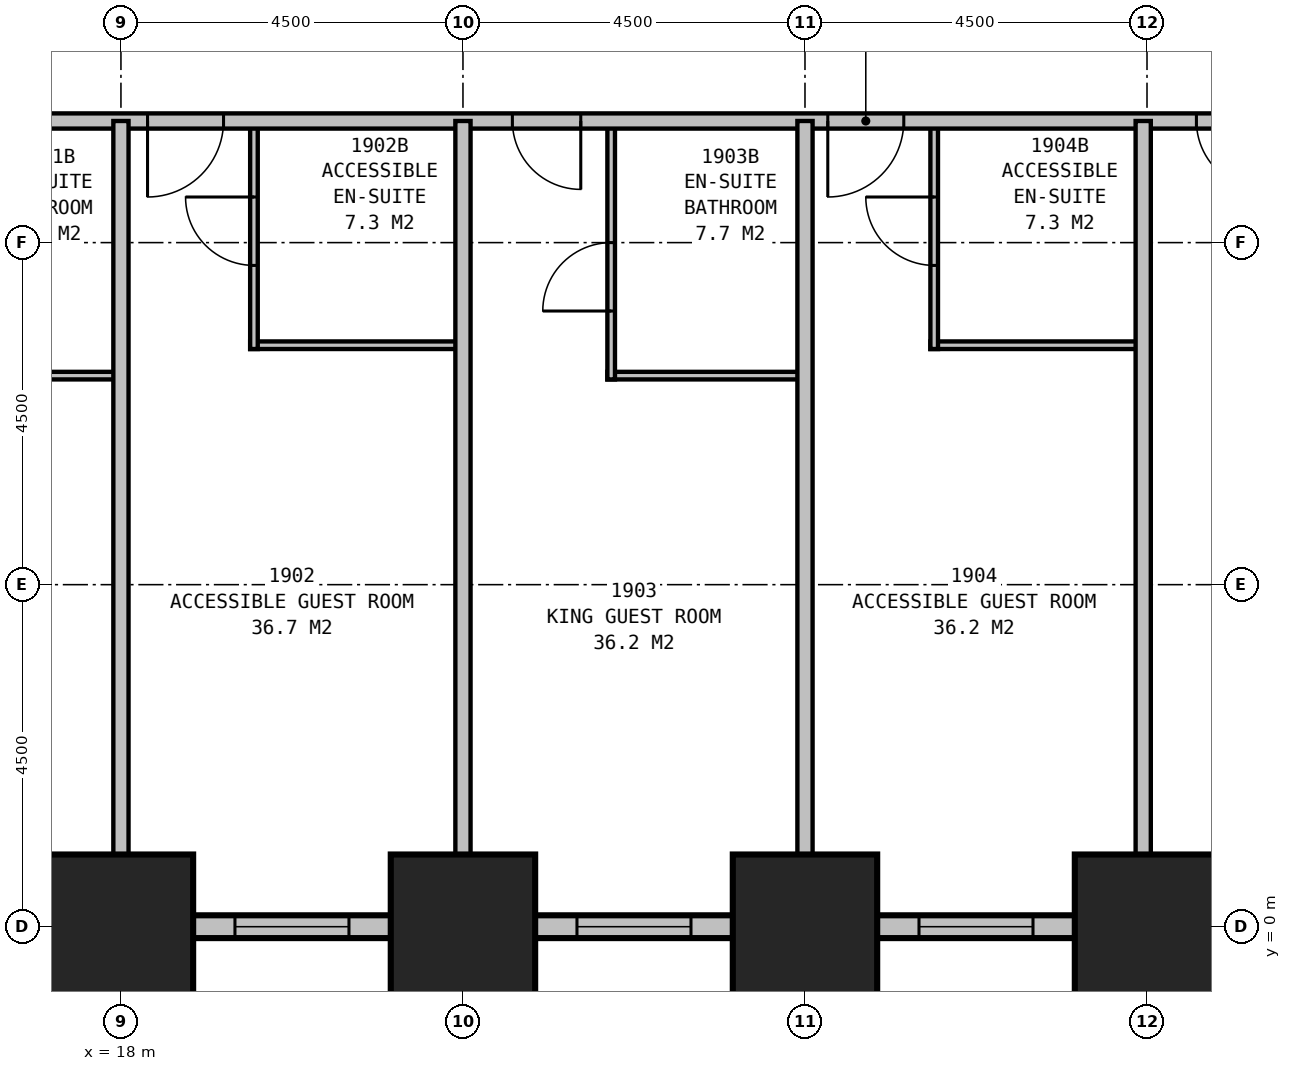
"""IFC4 building model, lengths in metres.
Left out: names, types, materials, properties, quantities, classifications, styles, units other than length and angle.
Written with IfcOpenShell. Run it as: python <this file> out.ifc"""

import sys

from ifc_helpers import new_model, si_unit, direction, frame, frame_2d, origin, origin_2d, place, context, subcontext, project, spatial, rectangle, extrude, element, fill, save


model = new_model("IFC4")
c1 = context("Model", 3, precision=1e-05, world=origin(), true_north=direction((0.0, 1.0)))
c2 = subcontext(c1, "Body", "Model", "MODEL_VIEW")
j1 = project(units=[si_unit("LENGTHUNIT", "METRE"), si_unit("PLANEANGLEUNIT", "RADIAN")], contexts=[c1])
p1 = place(None, origin())
s1 = spatial("IfcSite", under=j1, at=p1, CompositionType="ELEMENT")
p2 = place(p1, origin())
s2 = spatial("IfcBuilding", under=s1, at=p2, CompositionType="ELEMENT")
p3 = place(p2, frame((0.0, 0.0, 78.7)))
s3 = spatial("IfcBuildingStorey", under=s2, at=p3, CompositionType="ELEMENT", Elevation=78.7)
for number, where, z_axis, x_axis in (
    (1, (18.0, 0.0, 0.0), (0.0, 0.0, 1.0), (1.0, 0.0, 0.0)),
    (2, (22.5, 0.0, 0.0), (0.0, 0.0, 1.0), (1.0, 0.0, 0.0)),
    (3, (27.0, 0.0, 0.0), (0.0, 0.0, 1.0), (1.0, 0.0, 0.0)),
    (4, (31.5, 0.0, 0.0), (0.0, 0.0, 1.0), (1.0, 0.0, 0.0)),
):
    element("IfcColumn", number, at=place(p3, frame(where, z_axis=z_axis, x_axis=x_axis)), inside=s3, PredefinedType="COLUMN", context=c2, shape_type="SweptSolid", body=[
        extrude(rectangle(XDim=1.9, YDim=1.9, at=origin_2d()), origin(), (0.0, 0.0, 1.0), 3.5),
    ])
p4 = place(p3, frame((4.35, 0.0, 0.0), z_axis=(0.0, 0.0, 1.0), x_axis=(1.0, 0.0, 0.0)))
e5 = element("IfcWall", 5, at=p4, inside=s3, PredefinedType="STANDARD", context=c2, shape_type="SweptSolid", body=[
    extrude(rectangle(XDim=40.8, YDim=0.3, at=frame_2d((20.4, 0.0))), origin(), (0.0, 0.0, 1.0), 2.05),
])
p5 = place(p4, frame((1.65, 0.0, 0.5)))
e6 = element("IfcOpeningElement", 6, at=p5, cuts=e5, PredefinedType="OPENING", context=c2, shape_type="SweptSolid", body=[
    extrude(rectangle(XDim=1.5, YDim=1.4, at=frame_2d((0.75, 0.7))), frame((0.0, 0.16, 0.0), z_axis=(0.0, -1.0, 0.0), x_axis=(1.0, 0.0, 0.0)), (0.0, 0.0, 1.0), 0.32),
])
p6 = place(p4, frame((6.15, 0.0, 0.5)))
e7 = element("IfcOpeningElement", 7, at=p6, cuts=e5, PredefinedType="OPENING", context=c2, shape_type="SweptSolid", body=[
    extrude(rectangle(XDim=1.5, YDim=1.4, at=frame_2d((0.75, 0.7))), frame((0.0, 0.16, 0.0), z_axis=(0.0, -1.0, 0.0), x_axis=(1.0, 0.0, 0.0)), (0.0, 0.0, 1.0), 0.32),
])
p7 = place(p4, frame((10.65, 0.0, 0.5)))
e8 = element("IfcOpeningElement", 8, at=p7, cuts=e5, PredefinedType="OPENING", context=c2, shape_type="SweptSolid", body=[
    extrude(rectangle(XDim=1.5, YDim=1.4, at=frame_2d((0.75, 0.7))), frame((0.0, 0.16, 0.0), z_axis=(0.0, -1.0, 0.0), x_axis=(1.0, 0.0, 0.0)), (0.0, 0.0, 1.0), 0.32),
])
p8 = place(p4, frame((15.15, 0.0, 0.5)))
e9 = element("IfcOpeningElement", 9, at=p8, cuts=e5, PredefinedType="OPENING", context=c2, shape_type="SweptSolid", body=[
    extrude(rectangle(XDim=1.5, YDim=1.4, at=frame_2d((0.75, 0.7))), frame((0.0, 0.16, 0.0), z_axis=(0.0, -1.0, 0.0), x_axis=(1.0, 0.0, 0.0)), (0.0, 0.0, 1.0), 0.32),
])
p9 = place(p4, frame((19.65, 0.0, 0.5)))
e10 = element("IfcOpeningElement", 10, at=p9, cuts=e5, PredefinedType="OPENING", context=c2, shape_type="SweptSolid", body=[
    extrude(rectangle(XDim=1.5, YDim=1.4, at=frame_2d((0.75, 0.7))), frame((0.0, 0.16, 0.0), z_axis=(0.0, -1.0, 0.0), x_axis=(1.0, 0.0, 0.0)), (0.0, 0.0, 1.0), 0.32),
])
p10 = place(p4, frame((24.15, 0.0, 0.5)))
e11 = element("IfcOpeningElement", 11, at=p10, cuts=e5, PredefinedType="OPENING", context=c2, shape_type="SweptSolid", body=[
    extrude(rectangle(XDim=1.5, YDim=1.4, at=frame_2d((0.75, 0.7))), frame((0.0, 0.16, 0.0), z_axis=(0.0, -1.0, 0.0), x_axis=(1.0, 0.0, 0.0)), (0.0, 0.0, 1.0), 0.32),
])
p11 = place(p4, frame((28.65, 0.0, 0.5)))
e12 = element("IfcOpeningElement", 12, at=p11, cuts=e5, PredefinedType="OPENING", context=c2, shape_type="SweptSolid", body=[
    extrude(rectangle(XDim=1.5, YDim=1.4, at=frame_2d((0.75, 0.7))), frame((0.0, 0.16, 0.0), z_axis=(0.0, -1.0, 0.0), x_axis=(1.0, 0.0, 0.0)), (0.0, 0.0, 1.0), 0.32),
])
p12 = place(p4, frame((33.15, 0.0, 0.5)))
e13 = element("IfcOpeningElement", 13, at=p12, cuts=e5, PredefinedType="OPENING", context=c2, shape_type="SweptSolid", body=[
    extrude(rectangle(XDim=1.5, YDim=1.4, at=frame_2d((0.75, 0.7))), frame((0.0, 0.16, 0.0), z_axis=(0.0, -1.0, 0.0), x_axis=(1.0, 0.0, 0.0)), (0.0, 0.0, 1.0), 0.32),
])
p13 = place(p4, frame((37.65, 0.0, 0.5)))
e14 = element("IfcOpeningElement", 14, at=p13, cuts=e5, PredefinedType="OPENING", context=c2, shape_type="SweptSolid", body=[
    extrude(rectangle(XDim=1.5, YDim=1.4, at=frame_2d((0.75, 0.7))), frame((0.0, 0.16, 0.0), z_axis=(0.0, -1.0, 0.0), x_axis=(1.0, 0.0, 0.0)), (0.0, 0.0, 1.0), 0.32),
])
p14 = place(p3, frame((11.2, 10.6, 0.0), z_axis=(0.0, 0.0, 1.0), x_axis=(1.0, 0.0, 0.0)))
e15 = element("IfcWall", 15, at=p14, inside=s3, PredefinedType="PARTITIONING", context=c2, shape_type="SweptSolid", body=[
    extrude(rectangle(XDim=27.1, YDim=0.2, at=frame_2d((13.55, 0.0))), origin(), (0.0, 0.0, 1.0), 3.25),
])
p15 = place(p14, frame((3.85, 0.0, 0.0), z_axis=(0.0, 0.0, 1.0), x_axis=(-1.0, 0.0, 0.0)))
e16 = element("IfcOpeningElement", 16, at=p15, cuts=e15, PredefinedType="OPENING", context=c2, shape_type="SweptSolid", body=[
    extrude(rectangle(XDim=0.9, YDim=2.1, at=frame_2d((0.45, 1.05))), frame((0.0, 0.11, 0.0), z_axis=(0.0, -1.0, 0.0), x_axis=(1.0, 0.0, 0.0)), (0.0, 0.0, 1.0), 0.22),
])
p16 = place(p14, frame((8.15, 0.0, 0.0), z_axis=(0.0, 0.0, 1.0), x_axis=(-1.0, 0.0, 0.0)))
e17 = element("IfcOpeningElement", 17, at=p16, cuts=e15, PredefinedType="OPENING", context=c2, shape_type="SweptSolid", body=[
    extrude(rectangle(XDim=1.0, YDim=2.1, at=frame_2d((0.5, 1.05))), frame((0.0, 0.11, 0.0), z_axis=(0.0, -1.0, 0.0), x_axis=(1.0, 0.0, 0.0)), (0.0, 0.0, 1.0), 0.22),
])
p17 = place(p14, frame((12.85, 0.0, 0.0), z_axis=(0.0, 0.0, 1.0), x_axis=(-1.0, 0.0, 0.0)))
e18 = element("IfcOpeningElement", 18, at=p17, cuts=e15, PredefinedType="OPENING", context=c2, shape_type="SweptSolid", body=[
    extrude(rectangle(XDim=0.9, YDim=2.1, at=frame_2d((0.45, 1.05))), frame((0.0, 0.11, 0.0), z_axis=(0.0, -1.0, 0.0), x_axis=(1.0, 0.0, 0.0)), (0.0, 0.0, 1.0), 0.22),
])
p18 = place(p14, frame((17.1, 0.0, 0.0), z_axis=(0.0, 0.0, 1.0), x_axis=(-1.0, 0.0, 0.0)))
e19 = element("IfcOpeningElement", 19, at=p18, cuts=e15, PredefinedType="OPENING", context=c2, shape_type="SweptSolid", body=[
    extrude(rectangle(XDim=1.0, YDim=2.1, at=frame_2d((0.5, 1.05))), frame((0.0, 0.11, 0.0), z_axis=(0.0, -1.0, 0.0), x_axis=(1.0, 0.0, 0.0)), (0.0, 0.0, 1.0), 0.22),
])
p19 = place(p14, frame((21.85, 0.0, 0.0), z_axis=(0.0, 0.0, 1.0), x_axis=(-1.0, 0.0, 0.0)))
e20 = element("IfcOpeningElement", 20, at=p19, cuts=e15, PredefinedType="OPENING", context=c2, shape_type="SweptSolid", body=[
    extrude(rectangle(XDim=0.9, YDim=2.1, at=frame_2d((0.45, 1.05))), frame((0.0, 0.11, 0.0), z_axis=(0.0, -1.0, 0.0), x_axis=(1.0, 0.0, 0.0)), (0.0, 0.0, 1.0), 0.22),
])
p20 = place(p14, frame((1.6, 0.0, 0.0), z_axis=(0.0, 0.0, 1.0), x_axis=(-1.0, 0.0, 0.0)))
e21 = element("IfcOpeningElement", 21, at=p20, cuts=e15, PredefinedType="OPENING", context=c2, shape_type="SweptSolid", body=[
    extrude(rectangle(XDim=0.9, YDim=2.1, at=frame_2d((0.45, 1.05))), frame((0.0, 0.11, 0.0), z_axis=(0.0, -1.0, 0.0), x_axis=(1.0, 0.0, 0.0)), (0.0, 0.0, 1.0), 0.22),
])
p21 = place(p14, frame((26.4, 0.0, 0.0), z_axis=(0.0, 0.0, 1.0), x_axis=(-1.0, 0.0, 0.0)))
e22 = element("IfcOpeningElement", 22, at=p21, cuts=e15, PredefinedType="OPENING", context=c2, shape_type="SweptSolid", body=[
    extrude(rectangle(XDim=0.9, YDim=2.1, at=frame_2d((0.45, 1.05))), frame((0.0, 0.11, 0.0), z_axis=(0.0, -1.0, 0.0), x_axis=(1.0, 0.0, 0.0)), (0.0, 0.0, 1.0), 0.22),
])
for number, where, z_axis, x_axis in (
    (23, (18.0, 10.6, 0.0), (0.0, 0.0, 1.0), (0.0, -1.0, 0.0)),
    (24, (22.5, 10.6, 0.0), (0.0, 0.0, 1.0), (0.0, -1.0, 0.0)),
    (25, (27.0, 10.6, 0.0), (0.0, 0.0, 1.0), (0.0, -1.0, 0.0)),
    (26, (31.45, 10.6, 0.0), (0.0, 0.0, 1.0), (0.0, -1.0, 0.0)),
):
    element("IfcWall", number, at=place(p3, frame(where, z_axis=z_axis, x_axis=x_axis)), inside=s3, PredefinedType="PARTITIONING", context=c2, shape_type="SweptSolid", body=[
        extrude(rectangle(XDim=10.6, YDim=0.2, at=frame_2d((5.3, 0.0))), origin(), (0.0, 0.0, 1.0), 2.25),
    ])
p22 = place(p3, frame((15.4, 7.25, 0.0), z_axis=(0.0, 0.0, 1.0), x_axis=(1.0, 0.0, 0.0)))
e27 = element("IfcWall", 27, at=p22, inside=s3, PredefinedType="PLUMBINGWALL", context=c2, shape_type="SweptSolid", body=[
    extrude(rectangle(XDim=2.6, YDim=0.1, at=frame_2d((1.3, 0.0))), origin(), (0.0, 0.0, 1.0), 3.25),
])
p23 = place(p3, frame((19.7, 7.65, 0.0), z_axis=(0.0, 0.0, 1.0), x_axis=(1.0, 0.0, 0.0)))
e28 = element("IfcWall", 28, at=p23, inside=s3, PredefinedType="PLUMBINGWALL", context=c2, shape_type="SweptSolid", body=[
    extrude(rectangle(XDim=2.8, YDim=0.1, at=frame_2d((1.4, 0.0))), origin(), (0.0, 0.0, 1.0), 3.25),
])
p24 = place(p3, frame((19.75, 10.6, 0.0), z_axis=(0.0, 0.0, 1.0), x_axis=(0.0, -1.0, 0.0)))
e29 = element("IfcWall", 29, at=p24, inside=s3, PredefinedType="PLUMBINGWALL", context=c2, shape_type="SweptSolid", body=[
    extrude(rectangle(XDim=3.0, YDim=0.1, at=frame_2d((1.5, 0.0))), origin(), (0.0, 0.0, 1.0), 3.25),
])
p25 = place(p24, frame((1.9, 0.0, 0.0), z_axis=(0.0, 0.0, 1.0), x_axis=(-1.0, 0.0, 0.0)))
e30 = element("IfcOpeningElement", 30, at=p25, cuts=e29, PredefinedType="OPENING", context=c2, shape_type="SweptSolid", body=[
    extrude(rectangle(XDim=0.9, YDim=2.1, at=frame_2d((0.45, 1.05))), frame((0.0, 0.06, 0.0), z_axis=(0.0, -1.0, 0.0), x_axis=(1.0, 0.0, 0.0)), (0.0, 0.0, 1.0), 0.12),
])
p26 = place(p3, frame((24.4, 7.25, 0.0), z_axis=(0.0, 0.0, 1.0), x_axis=(1.0, 0.0, 0.0)))
e31 = element("IfcWall", 31, at=p26, inside=s3, PredefinedType="PLUMBINGWALL", context=c2, shape_type="SweptSolid", body=[
    extrude(rectangle(XDim=2.6, YDim=0.1, at=frame_2d((1.3, 0.0))), origin(), (0.0, 0.0, 1.0), 3.25),
])
p27 = place(p3, frame((24.45, 10.6, 0.0), z_axis=(0.0, 0.0, 1.0), x_axis=(0.0, -1.0, 0.0)))
e32 = element("IfcWall", 32, at=p27, inside=s3, PredefinedType="PLUMBINGWALL", context=c2, shape_type="SweptSolid", body=[
    extrude(rectangle(XDim=3.4, YDim=0.1, at=frame_2d((1.7, 0.0))), origin(), (0.0, 0.0, 1.0), 3.25),
])
p28 = place(p27, frame((2.5, 0.0, 0.0), z_axis=(0.0, 0.0, 1.0), x_axis=(-1.0, 0.0, 0.0)))
e33 = element("IfcOpeningElement", 33, at=p28, cuts=e32, PredefinedType="OPENING", context=c2, shape_type="SweptSolid", body=[
    extrude(rectangle(XDim=0.9, YDim=2.1, at=frame_2d((0.45, 1.05))), frame((0.0, 0.06, 0.0), z_axis=(0.0, -1.0, 0.0), x_axis=(1.0, 0.0, 0.0)), (0.0, 0.0, 1.0), 0.12),
])
p29 = place(p3, frame((28.65, 7.65, 0.0), z_axis=(0.0, 0.0, 1.0), x_axis=(1.0, 0.0, 0.0)))
e34 = element("IfcWall", 34, at=p29, inside=s3, PredefinedType="PLUMBINGWALL", context=c2, shape_type="SweptSolid", body=[
    extrude(rectangle(XDim=2.8, YDim=0.1, at=frame_2d((1.4, 0.0))), origin(), (0.0, 0.0, 1.0), 3.25),
])
p30 = place(p3, frame((28.7, 10.6, 0.0), z_axis=(0.0, 0.0, 1.0), x_axis=(0.0, -1.0, 0.0)))
e35 = element("IfcWall", 35, at=p30, inside=s3, PredefinedType="PLUMBINGWALL", context=c2, shape_type="SweptSolid", body=[
    extrude(rectangle(XDim=3.0, YDim=0.1, at=frame_2d((1.5, 0.0))), origin(), (0.0, 0.0, 1.0), 3.25),
])
p31 = place(p30, frame((1.9, 0.0, 0.0), z_axis=(0.0, 0.0, 1.0), x_axis=(-1.0, 0.0, 0.0)))
e36 = element("IfcOpeningElement", 36, at=p31, cuts=e35, PredefinedType="OPENING", context=c2, shape_type="SweptSolid", body=[
    extrude(rectangle(XDim=0.9, YDim=2.1, at=frame_2d((0.45, 1.05))), frame((0.0, 0.06, 0.0), z_axis=(0.0, -1.0, 0.0), x_axis=(1.0, 0.0, 0.0)), (0.0, 0.0, 1.0), 0.12),
])
p32 = place(p8, origin())
e37 = element("IfcWindow", 37, at=p32, inside=s3, PartitioningType="SINGLE_PANEL", PredefinedType="WINDOW", context=c2, shape_type="SweptSolid", body=[
    extrude(rectangle(XDim=1.5, YDim=1.4, at=frame_2d((0.75, 0.7))), frame((0.0, 0.03, 0.0), z_axis=(0.0, -1.0, 0.0), x_axis=(1.0, 0.0, 0.0)), (0.0, 0.0, 1.0), 0.06),
])
fill(e9, e37)
p33 = place(p9, origin())
e38 = element("IfcWindow", 38, at=p33, inside=s3, PartitioningType="SINGLE_PANEL", PredefinedType="WINDOW", context=c2, shape_type="SweptSolid", body=[
    extrude(rectangle(XDim=1.5, YDim=1.4, at=frame_2d((0.75, 0.7))), frame((0.0, 0.03, 0.0), z_axis=(0.0, -1.0, 0.0), x_axis=(1.0, 0.0, 0.0)), (0.0, 0.0, 1.0), 0.06),
])
fill(e10, e38)
p34 = place(p10, origin())
e39 = element("IfcWindow", 39, at=p34, inside=s3, PartitioningType="SINGLE_PANEL", PredefinedType="WINDOW", context=c2, shape_type="SweptSolid", body=[
    extrude(rectangle(XDim=1.5, YDim=1.4, at=frame_2d((0.75, 0.7))), frame((0.0, 0.03, 0.0), z_axis=(0.0, -1.0, 0.0), x_axis=(1.0, 0.0, 0.0)), (0.0, 0.0, 1.0), 0.06),
])
fill(e11, e39)
p35 = place(p16, origin())
e40 = element("IfcDoor", 40, at=p35, inside=s3, OperationType="SINGLE_SWING_RIGHT", PredefinedType="DOOR", context=c2, shape_type="SweptSolid", body=[
    extrude(rectangle(XDim=1.0, YDim=2.1, at=frame_2d((0.5, 1.05))), frame((0.0, 0.025, 0.0), z_axis=(0.0, -1.0, 0.0), x_axis=(1.0, 0.0, 0.0)), (0.0, 0.0, 1.0), 0.05),
])
fill(e17, e40)
p36 = place(p17, origin())
e41 = element("IfcDoor", 41, at=p36, inside=s3, OperationType="SINGLE_SWING_LEFT", PredefinedType="DOOR", context=c2, shape_type="SweptSolid", body=[
    extrude(rectangle(XDim=0.9, YDim=2.1, at=frame_2d((0.45, 1.05))), frame((0.0, 0.025, 0.0), z_axis=(0.0, -1.0, 0.0), x_axis=(1.0, 0.0, 0.0)), (0.0, 0.0, 1.0), 0.05),
])
fill(e18, e41)
p37 = place(p18, origin())
e42 = element("IfcDoor", 42, at=p37, inside=s3, OperationType="SINGLE_SWING_RIGHT", PredefinedType="DOOR", context=c2, shape_type="SweptSolid", body=[
    extrude(rectangle(XDim=1.0, YDim=2.1, at=frame_2d((0.5, 1.05))), frame((0.0, 0.025, 0.0), z_axis=(0.0, -1.0, 0.0), x_axis=(1.0, 0.0, 0.0)), (0.0, 0.0, 1.0), 0.05),
])
fill(e19, e42)
p38 = place(p19, origin())
e43 = element("IfcDoor", 43, at=p38, inside=s3, OperationType="SINGLE_SWING_LEFT", PredefinedType="DOOR", context=c2, shape_type="SweptSolid", body=[
    extrude(rectangle(XDim=0.9, YDim=2.1, at=frame_2d((0.45, 1.05))), frame((0.0, 0.025, 0.0), z_axis=(0.0, -1.0, 0.0), x_axis=(1.0, 0.0, 0.0)), (0.0, 0.0, 1.0), 0.05),
])
fill(e20, e43)
p39 = place(p25, origin())
e44 = element("IfcDoor", 44, at=p39, inside=s3, OperationType="SINGLE_SWING_RIGHT", PredefinedType="DOOR", context=c2, shape_type="SweptSolid", body=[
    extrude(rectangle(XDim=0.9, YDim=2.1, at=frame_2d((0.45, 1.05))), frame((0.0, 0.025, 0.0), z_axis=(0.0, -1.0, 0.0), x_axis=(1.0, 0.0, 0.0)), (0.0, 0.0, 1.0), 0.05),
])
fill(e30, e44)
p40 = place(p28, origin())
e45 = element("IfcDoor", 45, at=p40, inside=s3, OperationType="SINGLE_SWING_LEFT", PredefinedType="DOOR", context=c2, shape_type="SweptSolid", body=[
    extrude(rectangle(XDim=0.9, YDim=2.1, at=frame_2d((0.45, 1.05))), frame((0.0, 0.025, 0.0), z_axis=(0.0, -1.0, 0.0), x_axis=(1.0, 0.0, 0.0)), (0.0, 0.0, 1.0), 0.05),
])
fill(e33, e45)
p41 = place(p31, origin())
e46 = element("IfcDoor", 46, at=p41, inside=s3, OperationType="SINGLE_SWING_RIGHT", PredefinedType="DOOR", context=c2, shape_type="SweptSolid", body=[
    extrude(rectangle(XDim=0.9, YDim=2.1, at=frame_2d((0.45, 1.05))), frame((0.0, 0.025, 0.0), z_axis=(0.0, -1.0, 0.0), x_axis=(1.0, 0.0, 0.0)), (0.0, 0.0, 1.0), 0.05),
])
fill(e36, e46)
save(model, sys.argv[1])
